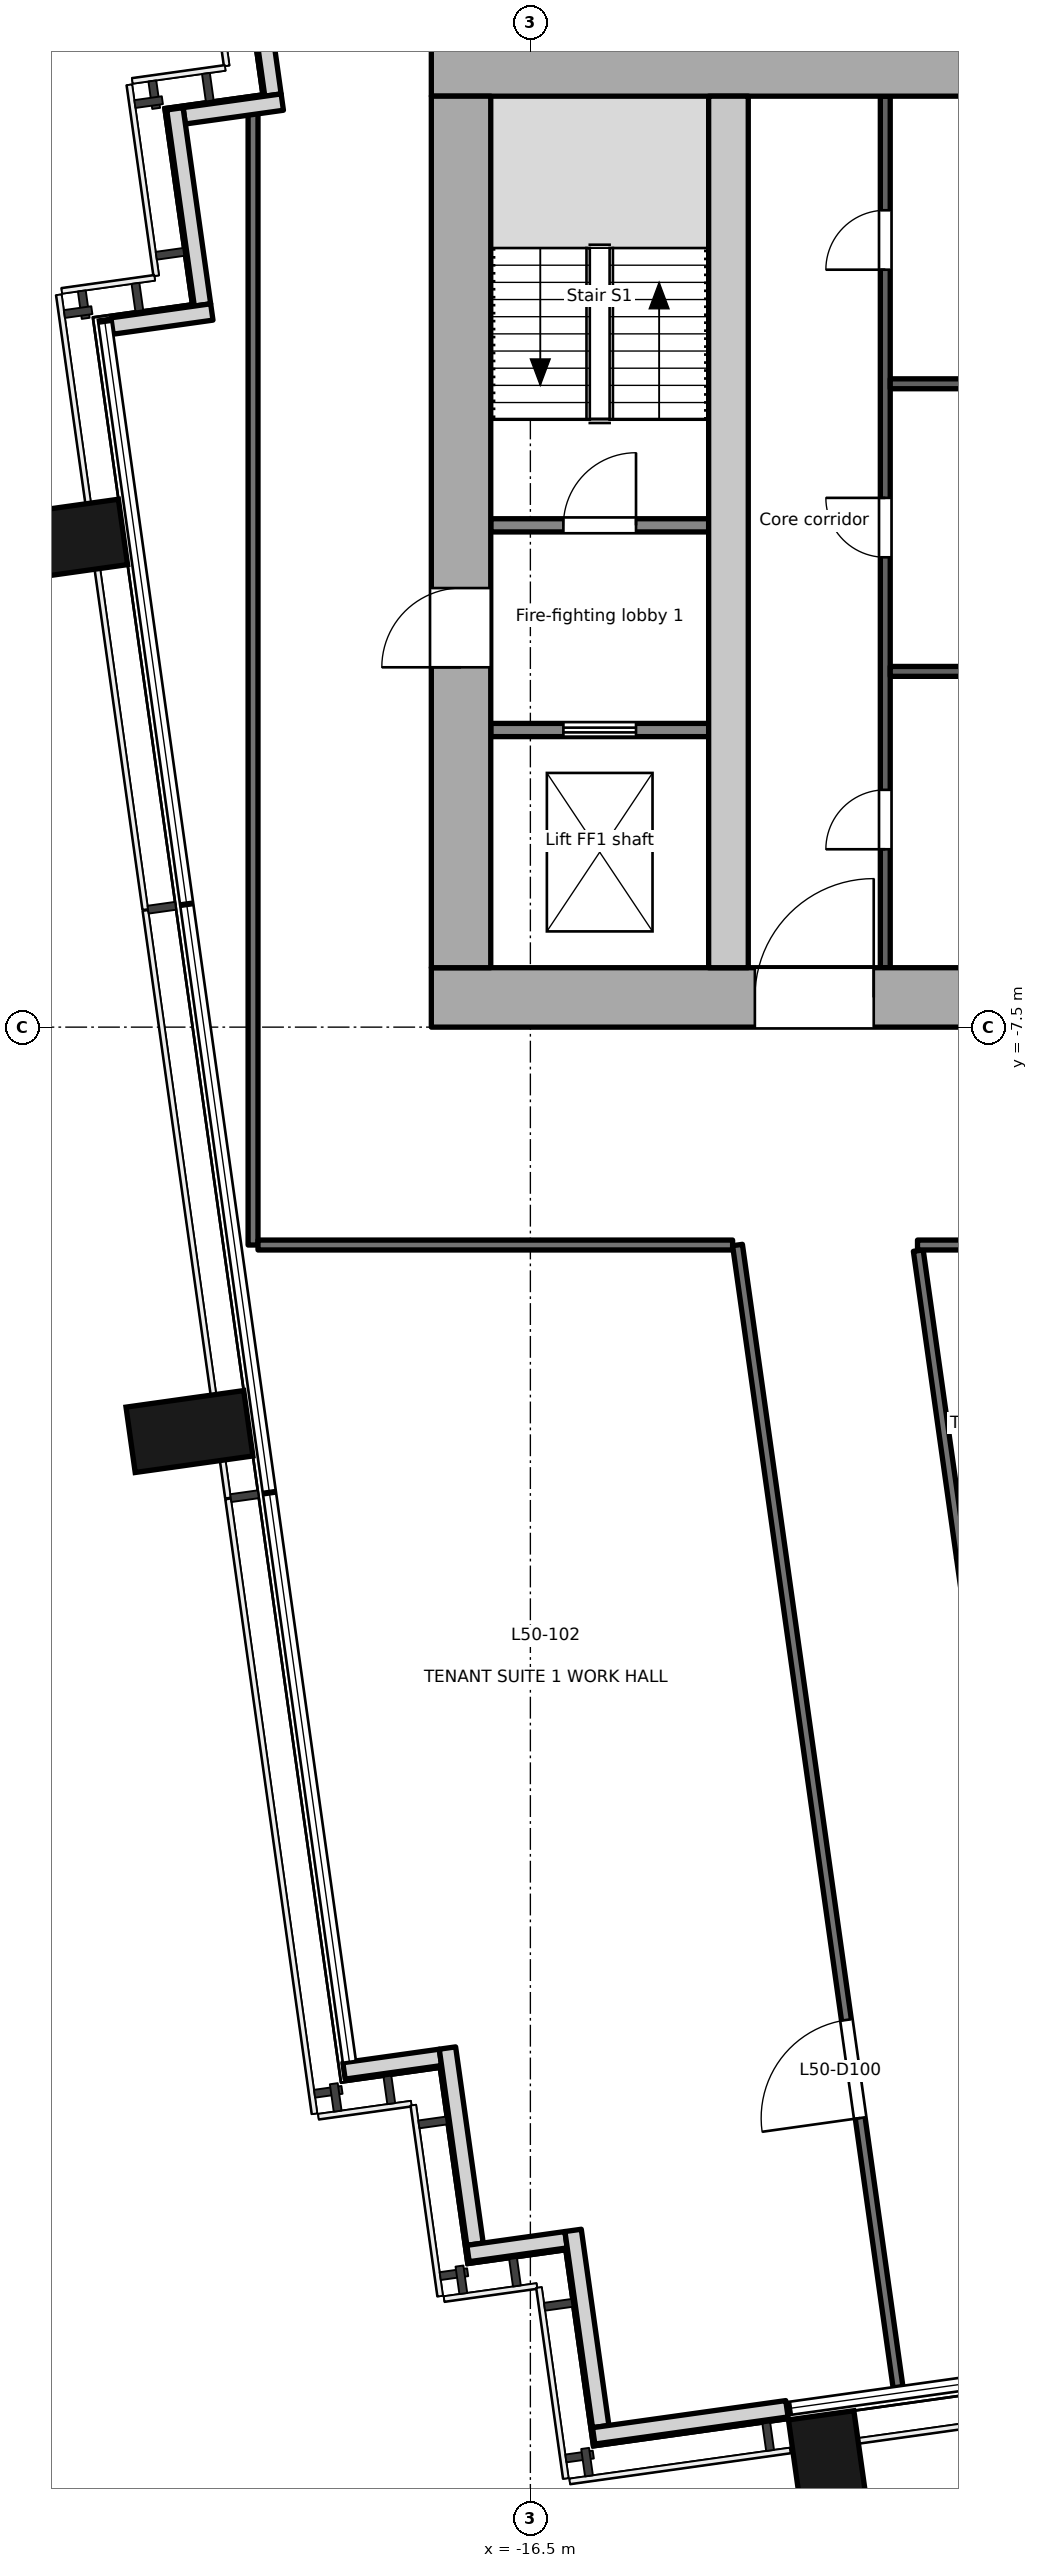
"""IFC4 building model, lengths in metres.
Left out: names, types, materials, properties, quantities, classifications, styles, units other than length and angle.
Written with IfcOpenShell. Run it as: python <this file> out.ifc"""

import sys

from ifc_helpers import new_model, si_unit, direction, frame, frame_2d, origin, origin_2d, place, context, subcontext, project, spatial, rectangle, extrude, element, fill, save


model = new_model("IFC4")
c1 = context("Model", 3, precision=1e-05, world=origin(), true_north=direction((0.0, 1.0)))
c2 = subcontext(c1, "Body", "Model", "MODEL_VIEW")
j1 = project(units=[si_unit("LENGTHUNIT", "METRE"), si_unit("PLANEANGLEUNIT", "RADIAN")], contexts=[c1])
p1 = place(None, origin())
s1 = spatial("IfcSite", under=j1, at=p1, CompositionType="ELEMENT")
p2 = place(p1, origin())
s2 = spatial("IfcBuilding", under=s1, at=p2, CompositionType="ELEMENT")
p3 = place(p2, frame((0.0, 0.0, 221.3)))
s3 = spatial("IfcBuildingStorey", under=s2, at=p3, CompositionType="ELEMENT", Elevation=221.3)
for number, where, z_axis, x_axis in (
    (1, (-11.971, -29.416, -0.2), (0.0, 0.0, 1.0), (0.99, 0.139, 0.0)),
    (2, (-21.663, -13.625, -0.2), (0.0, 0.0, 1.0), (-0.139, 0.99, 0.0)),
    (3, (-23.561, -0.125, -0.2), (0.0, 0.0, 1.0), (-0.139, 0.99, 0.0)),
):
    element("IfcColumn", number, at=place(p3, frame(where, z_axis=z_axis, x_axis=x_axis)), inside=s3, PredefinedType="COLUMN", context=c2, shape_type="SweptSolid", body=[
        extrude(rectangle(XDim=1.0, YDim=1.8, at=origin_2d()), origin(), (0.0, 0.0, 1.0), 3.9),
    ])
p4 = place(p3, frame((-20.815, 9.588, 0.0), z_axis=(0.0, 0.0, 1.0), x_axis=(0.138983028379, -0.9902947631, 0.0)))
e4 = element("IfcWall", 4, at=p4, inside=s3, PredefinedType="SOLIDWALL", context=c2, shape_type="SweptSolid", body=[
    extrude(rectangle(XDim=3.0, YDim=0.25, at=frame_2d((1.5, 0.0))), origin(), (0.0, 0.0, 1.0), 3.7),
])
p5 = place(p3, frame((-20.257, 6.51, 0.0), z_axis=(0.0, 0.0, 1.0), x_axis=(-0.990330117064, -0.138730887823, 0.0)))
e5 = element("IfcWall", 5, at=p5, inside=s3, PredefinedType="SOLIDWALL", context=c2, shape_type="SweptSolid", body=[
    extrude(rectangle(XDim=1.499, YDim=0.25, at=frame_2d((0.75, 0.0))), origin(), (0.0, 0.0, 1.0), 3.7),
])
p6 = place(p3, frame((-21.883, 6.409, 0.0), z_axis=(0.0, 0.0, 1.0), x_axis=(0.139324658755, -0.990246756855, 0.0)))
e6 = element("IfcWall", 6, at=p6, inside=s3, PredefinedType="SOLIDWALL", context=c2, shape_type="SweptSolid", body=[
    extrude(rectangle(XDim=3.0, YDim=0.25, at=frame_2d((1.5, 0.0))), origin(), (0.0, 0.0, 1.0), 3.7),
])
p7 = place(p3, frame((-21.324, 3.332, 0.0), z_axis=(0.0, 0.0, 1.0), x_axis=(-0.990238641016, -0.139382329723, 0.0)))
e7 = element("IfcWall", 7, at=p7, inside=s3, PredefinedType="SOLIDWALL", context=c2, shape_type="SweptSolid", body=[
    extrude(rectangle(XDim=1.526, YDim=0.25, at=frame_2d((0.763, 0.0))), origin(), (0.0, 0.0, 1.0), 3.7),
])
p8 = place(p3, frame((-19.322, -23.309, 0.0), z_axis=(0.0, 0.0, 1.0), x_axis=(0.990235520307, 0.13940449893, 0.0)))
e8 = element("IfcWall", 8, at=p8, inside=s3, PredefinedType="SOLIDWALL", context=c2, shape_type="SweptSolid", body=[
    extrude(rectangle(XDim=1.475, YDim=0.25, at=frame_2d((0.737, 0.0))), origin(), (0.0, 0.0, 1.0), 3.7),
])
p9 = place(p3, frame((-17.756, -22.962, 0.0), z_axis=(0.0, 0.0, 1.0), x_axis=(0.139393225799, -0.990237107263, 0.0)))
e9 = element("IfcWall", 9, at=p9, inside=s3, PredefinedType="SOLIDWALL", context=c2, shape_type="SweptSolid", body=[
    extrude(rectangle(XDim=3.0, YDim=0.25, at=frame_2d((1.5, 0.0))), origin(), (0.0, 0.0, 1.0), 3.7),
])
p10 = place(p3, frame((-17.444, -26.074, 0.0), z_axis=(0.0, 0.0, 1.0), x_axis=(0.990240434918, 0.139369584395, 0.0)))
e10 = element("IfcWall", 10, at=p10, inside=s3, PredefinedType="SOLIDWALL", context=c2, shape_type="SweptSolid", body=[
    extrude(rectangle(XDim=1.5, YDim=0.25, at=frame_2d((0.75, 0.0))), origin(), (0.0, 0.0, 1.0), 3.7),
])
p11 = place(p3, frame((-15.853, -25.724, 0.0), z_axis=(0.0, 0.0, 1.0), x_axis=(0.139302206688, -0.990249915532, 0.0)))
e11 = element("IfcWall", 11, at=p11, inside=s3, PredefinedType="SOLIDWALL", context=c2, shape_type="SweptSolid", body=[
    extrude(rectangle(XDim=3.0, YDim=0.25, at=frame_2d((1.5, 0.0))), origin(), (0.0, 0.0, 1.0), 3.7),
])
p12 = place(p3, frame((-15.541, -28.836, 0.0), z_axis=(0.0, 0.0, 1.0), x_axis=(0.990285396533, 0.139049751574, 0.0)))
e12 = element("IfcWall", 12, at=p12, inside=s3, PredefinedType="SOLIDWALL", context=c2, shape_type="SweptSolid", body=[
    extrude(rectangle(XDim=2.955, YDim=0.25, at=frame_2d((1.478, 0.0))), origin(), (0.0, 0.0, 1.0), 3.7),
])
p13 = place(p3, frame((-18.0, -7.05, -0.2), z_axis=(0.0, 0.0, 1.0), x_axis=(1.0, 0.0, 0.0)))
e13 = element("IfcWall", 13, at=p13, inside=s3, PredefinedType="SHEAR", context=c2, shape_type="SweptSolid", body=[
    extrude(rectangle(XDim=36.0, YDim=0.9, at=frame_2d((18.0, 0.0))), origin(), (0.0, 0.0, 1.0), 3.9),
])
p14 = place(p13, frame((4.9, 0.0, 0.2)))
e14 = element("IfcOpeningElement", 14, at=p14, cuts=e13, PredefinedType="OPENING", context=c2, shape_type="SweptSolid", body=[
    extrude(rectangle(XDim=1.8, YDim=2.1, at=frame_2d((0.9, 1.05))), frame((0.0, 0.46, 0.0), z_axis=(0.0, -1.0, 0.0), x_axis=(1.0, 0.0, 0.0)), (0.0, 0.0, 1.0), 0.921),
])
p15 = place(p13, frame((16.8, 0.0, 0.2)))
e15 = element("IfcOpeningElement", 15, at=p15, cuts=e13, PredefinedType="OPENING", context=c2, shape_type="SweptSolid", body=[
    extrude(rectangle(XDim=2.4, YDim=2.1, at=frame_2d((1.2, 1.05))), frame((0.0, 0.46, 0.0), z_axis=(0.0, -1.0, 0.0), x_axis=(1.0, 0.0, 0.0)), (0.0, 0.0, 1.0), 0.921),
])
p16 = place(p13, frame((26.1, 0.0, 0.2)))
e16 = element("IfcOpeningElement", 16, at=p16, cuts=e13, PredefinedType="OPENING", context=c2, shape_type="SweptSolid", body=[
    extrude(rectangle(XDim=2.4, YDim=2.1, at=frame_2d((1.2, 1.05))), frame((0.0, 0.46, 0.0), z_axis=(0.0, -1.0, 0.0), x_axis=(1.0, 0.0, 0.0)), (0.0, 0.0, 1.0), 0.921),
])
p17 = place(p3, frame((-18.0, 7.05, -0.2), z_axis=(0.0, 0.0, 1.0), x_axis=(1.0, 0.0, 0.0)))
e17 = element("IfcWall", 17, at=p17, inside=s3, PredefinedType="SHEAR", context=c2, shape_type="SweptSolid", body=[
    extrude(rectangle(XDim=36.0, YDim=0.9, at=frame_2d((18.0, 0.0))), origin(), (0.0, 0.0, 1.0), 3.9),
])
p18 = place(p3, frame((-17.55, -6.6, -0.2), z_axis=(0.0, 0.0, 1.0), x_axis=(0.0, 1.0, 0.0)))
e18 = element("IfcWall", 18, at=p18, inside=s3, PredefinedType="SHEAR", context=c2, shape_type="SweptSolid", body=[
    extrude(rectangle(XDim=13.2, YDim=0.9, at=frame_2d((6.6, 0.0))), origin(), (0.0, 0.0, 1.0), 3.9),
])
p19 = place(p18, frame((4.55, 0.0, 0.2)))
e19 = element("IfcOpeningElement", 19, at=p19, cuts=e18, PredefinedType="OPENING", context=c2, shape_type="SweptSolid", body=[
    extrude(rectangle(XDim=1.2, YDim=2.1, at=frame_2d((0.6, 1.05))), frame((0.0, 0.46, 0.0), z_axis=(0.0, -1.0, 0.0), x_axis=(1.0, 0.0, 0.0)), (0.0, 0.0, 1.0), 0.921),
])
p20 = place(p3, frame((-13.5, -6.6, -0.2), z_axis=(0.0, 0.0, 1.0), x_axis=(0.0, 1.0, 0.0)))
e20 = element("IfcWall", 20, at=p20, inside=s3, PredefinedType="SHEAR", context=c2, shape_type="SweptSolid", body=[
    extrude(rectangle(XDim=13.2, YDim=0.6, at=frame_2d((6.6, 0.0))), origin(), (0.0, 0.0, 1.0), 3.9),
])
p21 = place(p3, frame((-17.1, -3.0, 0.0), z_axis=(0.0, 0.0, 1.0), x_axis=(1.0, 0.0, 0.0)))
e21 = element("IfcWall", 21, at=p21, inside=s3, PredefinedType="PARTITIONING", context=c2, shape_type="SweptSolid", body=[
    extrude(rectangle(XDim=3.3, YDim=0.2, at=frame_2d((1.65, 0.0))), origin(), (0.0, 0.0, 1.0), 3.7),
])
p22 = place(p21, frame((1.1, 0.0, 0.0)))
e22 = element("IfcOpeningElement", 22, at=p22, cuts=e21, PredefinedType="OPENING", context=c2, shape_type="SweptSolid", body=[
    extrude(rectangle(XDim=1.1, YDim=2.1, at=frame_2d((0.55, 1.05))), frame((0.0, 0.111, 0.0), z_axis=(0.0, -1.0, 0.0), x_axis=(1.0, 0.0, 0.0)), (0.0, 0.0, 1.0), 0.221),
])
p23 = place(p3, frame((-17.1, 0.1, 0.0), z_axis=(0.0, 0.0, 1.0), x_axis=(1.0, 0.0, 0.0)))
e23 = element("IfcWall", 23, at=p23, inside=s3, PredefinedType="PARTITIONING", context=c2, shape_type="SweptSolid", body=[
    extrude(rectangle(XDim=3.3, YDim=0.2, at=frame_2d((1.65, 0.0))), origin(), (0.0, 0.0, 1.0), 3.7),
])
p24 = place(p23, frame((1.1, 0.0, 0.0)))
e24 = element("IfcOpeningElement", 24, at=p24, cuts=e23, PredefinedType="OPENING", context=c2, shape_type="SweptSolid", body=[
    extrude(rectangle(XDim=1.1, YDim=2.1, at=frame_2d((0.55, 1.05))), frame((0.0, 0.111, 0.0), z_axis=(0.0, -1.0, 0.0), x_axis=(1.0, 0.0, 0.0)), (0.0, 0.0, 1.0), 0.221),
])
p25 = place(p3, frame((-11.125, -6.6, 0.0), z_axis=(0.0, 0.0, 1.0), x_axis=(0.0, 1.0, 0.0)))
e25 = element("IfcWall", 25, at=p25, inside=s3, PredefinedType="PARTITIONING", context=c2, shape_type="SweptSolid", body=[
    extrude(rectangle(XDim=13.2, YDim=0.15, at=frame_2d((6.6, 0.0))), origin(), (0.0, 0.0, 1.0), 3.7),
])
p26 = place(p25, frame((1.794, 0.0, 0.0)))
e26 = element("IfcOpeningElement", 26, at=p26, cuts=e25, PredefinedType="OPENING", context=c2, shape_type="SweptSolid", body=[
    extrude(rectangle(XDim=0.9, YDim=2.1, at=frame_2d((0.45, 1.05))), frame((0.0, 0.085, 0.0), z_axis=(0.0, -1.0, 0.0), x_axis=(1.0, 0.0, 0.0)), (0.0, 0.0, 1.0), 0.171),
])
p27 = place(p25, frame((6.216, 0.0, 0.0)))
e27 = element("IfcOpeningElement", 27, at=p27, cuts=e25, PredefinedType="OPENING", context=c2, shape_type="SweptSolid", body=[
    extrude(rectangle(XDim=0.9, YDim=2.1, at=frame_2d((0.45, 1.05))), frame((0.0, 0.085, 0.0), z_axis=(0.0, -1.0, 0.0), x_axis=(1.0, 0.0, 0.0)), (0.0, 0.0, 1.0), 0.171),
])
p28 = place(p25, frame((10.572, 0.0, 0.0)))
e28 = element("IfcOpeningElement", 28, at=p28, cuts=e25, PredefinedType="OPENING", context=c2, shape_type="SweptSolid", body=[
    extrude(rectangle(XDim=0.9, YDim=2.1, at=frame_2d((0.45, 1.05))), frame((0.0, 0.085, 0.0), z_axis=(0.0, -1.0, 0.0), x_axis=(1.0, 0.0, 0.0)), (0.0, 0.0, 1.0), 0.171),
])
for number, where, z_axis, x_axis in (
    (29, (-11.05, -2.112, 0.0), (0.0, 0.0, 1.0), (1.0, 0.0, 0.0)),
    (30, (-11.05, 2.244, 0.0), (0.0, 0.0, 1.0), (1.0, 0.0, 0.0)),
):
    element("IfcWall", number, at=place(p3, frame(where, z_axis=z_axis, x_axis=x_axis)), inside=s3, PredefinedType="PARTITIONING", context=c2, shape_type="SweptSolid", body=[
        extrude(rectangle(XDim=6.25, YDim=0.15, at=frame_2d((3.125, 0.0))), origin(), (0.0, 0.0, 1.0), 3.7),
    ])
p29 = place(p3, frame((-20.7, -10.8, 0.0), z_axis=(0.0, 0.0, 1.0), x_axis=(0.0, 1.0, 0.0)))
e31 = element("IfcWall", 31, at=p29, inside=s3, PredefinedType="PARTITIONING", context=c2, shape_type="SweptSolid", body=[
    extrude(rectangle(XDim=17.156, YDim=0.15, at=frame_2d((8.578, 0.0))), origin(), (0.0, 0.0, 1.0), 3.4),
])
p30 = place(p3, frame((-13.437, -10.8, 0.0), z_axis=(0.0, 0.0, 1.0), x_axis=(-1.0, 0.0, 0.0)))
e32 = element("IfcWall", 32, at=p30, inside=s3, PredefinedType="PARTITIONING", context=c2, shape_type="SweptSolid", body=[
    extrude(rectangle(XDim=7.188, YDim=0.15, at=frame_2d((3.594, 0.0))), origin(), (0.0, 0.0, 1.0), 3.7),
])
p31 = place(p3, frame((-10.932, -28.099, 0.0), z_axis=(0.0, 0.0, 1.0), x_axis=(-0.139168963114, 0.990268650269, 0.0)))
e33 = element("IfcWall", 33, at=p31, inside=s3, PredefinedType="PARTITIONING", context=c2, shape_type="SweptSolid", body=[
    extrude(rectangle(XDim=17.469, YDim=0.15, at=frame_2d((8.734, 0.0))), origin(), (0.0, 0.0, 1.0), 3.7),
])
p32 = place(p31, frame((4.117, 0.0, 0.0)))
e34 = element("IfcOpeningElement", 34, at=p32, cuts=e33, PredefinedType="OPENING", context=c2, shape_type="SweptSolid", body=[
    extrude(rectangle(XDim=1.5, YDim=2.1, at=frame_2d((0.75, 1.05))), frame((0.0, 0.085, 0.0), z_axis=(0.0, -1.0, 0.0), x_axis=(1.0, 0.0, 0.0)), (0.0, 0.0, 1.0), 0.171),
])
p33 = place(p3, frame((-9.972, -15.533, 0.0), z_axis=(0.0, 0.0, 1.0), x_axis=(0.139149686673, -0.990271359123, 0.0)))
e35 = element("IfcWall", 35, at=p33, inside=s3, PredefinedType="PARTITIONING", context=c2, shape_type="SweptSolid", body=[
    extrude(rectangle(XDim=12.31, YDim=0.15, at=frame_2d((6.155, 0.0))), origin(), (0.0, 0.0, 1.0), 2.8),
])
p34 = place(p33, frame((7.757, 0.0, 0.0)))
e36 = element("IfcOpeningElement", 36, at=p34, cuts=e35, PredefinedType="OPENING", context=c2, shape_type="SweptSolid", body=[
    extrude(rectangle(XDim=1.8, YDim=2.1, at=frame_2d((0.9, 1.05))), frame((0.0, 0.085, 0.0), z_axis=(0.0, -1.0, 0.0), x_axis=(1.0, 0.0, 0.0)), (0.0, 0.0, 1.0), 0.171),
])
p35 = place(p3, frame((-10.625, -10.885, 0.0), z_axis=(0.0, 0.0, 1.0), x_axis=(0.139112996275, -0.990276514044, 0.0)))
e37 = element("IfcWall", 37, at=p35, inside=s3, PredefinedType="PARTITIONING", context=c2, shape_type="SweptSolid", body=[
    extrude(rectangle(XDim=4.695, YDim=0.15, at=frame_2d((2.347, 0.0))), origin(), (0.0, 0.0, 1.0), 3.7),
])
p36 = place(p3, frame((-4.557, -10.8, 0.0), z_axis=(0.0, 0.0, 1.0), x_axis=(-1.0, 0.0, 0.0)))
e38 = element("IfcWall", 38, at=p36, inside=s3, PredefinedType="PARTITIONING", context=c2, shape_type="SweptSolid", body=[
    extrude(rectangle(XDim=6.08, YDim=0.15, at=frame_2d((3.04, 0.0))), origin(), (0.0, 0.0, 1.0), 2.8),
])
p37 = place(p22, origin())
e39 = element("IfcDoor", 39, at=p37, inside=s3, OperationType="DOUBLE_DOOR_SLIDING", PredefinedType="DOOR", context=c2, shape_type="SweptSolid", body=[
    extrude(rectangle(XDim=1.1, YDim=2.1, at=frame_2d((0.55, 1.05))), frame((0.0, 0.025, 0.0), z_axis=(0.0, -1.0, 0.0), x_axis=(1.0, 0.0, 0.0)), (0.0, 0.0, 1.0), 0.05),
])
fill(e22, e39)
p38 = place(p19, origin())
e40 = element("IfcDoor", 40, at=p38, inside=s3, OperationType="SINGLE_SWING_LEFT", PredefinedType="DOOR", context=c2, shape_type="SweptSolid", body=[
    extrude(rectangle(XDim=1.2, YDim=2.1, at=frame_2d((0.6, 1.05))), frame((0.0, 0.025, 0.0), z_axis=(0.0, -1.0, 0.0), x_axis=(1.0, 0.0, 0.0)), (0.0, 0.0, 1.0), 0.05),
])
fill(e19, e40)
p39 = place(p24, origin())
e41 = element("IfcDoor", 41, at=p39, inside=s3, OperationType="SINGLE_SWING_RIGHT", PredefinedType="DOOR", context=c2, shape_type="SweptSolid", body=[
    extrude(rectangle(XDim=1.1, YDim=2.1, at=frame_2d((0.55, 1.05))), frame((0.0, 0.025, 0.0), z_axis=(0.0, -1.0, 0.0), x_axis=(1.0, 0.0, 0.0)), (0.0, 0.0, 1.0), 0.05),
])
fill(e24, e41)
p40 = place(p26, origin())
e42 = element("IfcDoor", 42, at=p40, inside=s3, OperationType="SINGLE_SWING_LEFT", PredefinedType="DOOR", context=c2, shape_type="SweptSolid", body=[
    extrude(rectangle(XDim=0.9, YDim=2.1, at=frame_2d((0.45, 1.05))), frame((0.0, 0.025, 0.0), z_axis=(0.0, -1.0, 0.0), x_axis=(1.0, 0.0, 0.0)), (0.0, 0.0, 1.0), 0.05),
])
fill(e26, e42)
p41 = place(p27, origin())
e43 = element("IfcDoor", 43, at=p41, inside=s3, OperationType="SINGLE_SWING_RIGHT", PredefinedType="DOOR", context=c2, shape_type="SweptSolid", body=[
    extrude(rectangle(XDim=0.9, YDim=2.1, at=frame_2d((0.45, 1.05))), frame((0.0, 0.025, 0.0), z_axis=(0.0, -1.0, 0.0), x_axis=(1.0, 0.0, 0.0)), (0.0, 0.0, 1.0), 0.05),
])
fill(e27, e43)
p42 = place(p28, origin())
e44 = element("IfcDoor", 44, at=p42, inside=s3, OperationType="SINGLE_SWING_LEFT", PredefinedType="DOOR", context=c2, shape_type="SweptSolid", body=[
    extrude(rectangle(XDim=0.9, YDim=2.1, at=frame_2d((0.45, 1.05))), frame((0.0, 0.025, 0.0), z_axis=(0.0, -1.0, 0.0), x_axis=(1.0, 0.0, 0.0)), (0.0, 0.0, 1.0), 0.05),
])
fill(e28, e44)
p43 = place(p14, origin())
e45 = element("IfcDoor", 45, at=p43, inside=s3, OperationType="SINGLE_SWING_RIGHT", PredefinedType="DOOR", context=c2, shape_type="SweptSolid", body=[
    extrude(rectangle(XDim=1.8, YDim=2.1, at=frame_2d((0.9, 1.05))), frame((0.0, 0.025, 0.0), z_axis=(0.0, -1.0, 0.0), x_axis=(1.0, 0.0, 0.0)), (0.0, 0.0, 1.0), 0.05),
])
fill(e14, e45)
p44 = place(p32, origin())
e46 = element("IfcDoor", 46, at=p44, inside=s3, OperationType="DOUBLE_DOOR_SINGLE_SWING", PredefinedType="DOOR", context=c2, shape_type="SweptSolid", body=[
    extrude(rectangle(XDim=1.5, YDim=2.1, at=frame_2d((0.75, 1.05))), frame((0.0, 0.025, 0.0), z_axis=(0.0, -1.0, 0.0), x_axis=(1.0, 0.0, 0.0)), (0.0, 0.0, 1.0), 0.05),
])
fill(e34, e46)
save(model, sys.argv[1])
